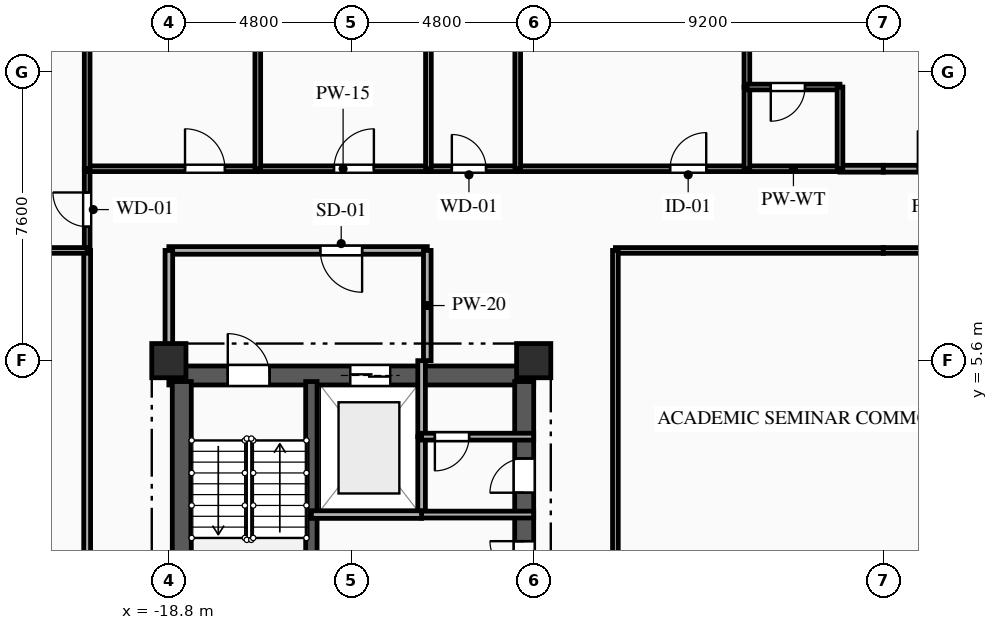
"""IFC4 building model, lengths in metres.
Left out: names, types, materials, properties, quantities, classifications, styles, units other than length and angle.
Written with IfcOpenShell. Run it as: python <this file> out.ifc"""

import sys

from ifc_helpers import new_model, si_unit, direction, frame, frame_2d, origin, origin_2d, place, context, subcontext, project, spatial, rectangle, extrude, element, fill, save


model = new_model("IFC4")
c1 = context("Model", 3, precision=1e-05, world=origin(), true_north=direction((0.0, 1.0)))
c2 = subcontext(c1, "Body", "Model", "MODEL_VIEW")
j1 = project(units=[si_unit("LENGTHUNIT", "METRE"), si_unit("PLANEANGLEUNIT", "RADIAN")], contexts=[c1])
p1 = place(None, origin())
s1 = spatial("IfcSite", under=j1, at=p1, CompositionType="ELEMENT")
p2 = place(p1, origin())
s2 = spatial("IfcBuilding", under=s1, at=p2, CompositionType="ELEMENT")
p3 = place(p2, frame((0.0, 0.0, 164.5)))
s3 = spatial("IfcBuildingStorey", under=s2, at=p3, CompositionType="ELEMENT", Elevation=164.5)
for number, where, z_axis, x_axis in (
    (1, (-18.8, 5.6, 0.0), (0.0, 0.0, 1.0), (1.0, 0.0, 0.0)),
    (2, (-9.2, 5.6, 0.0), (0.0, 0.0, 1.0), (1.0, 0.0, 0.0)),
):
    element("IfcColumn", number, at=place(p3, frame(where, z_axis=z_axis, x_axis=x_axis)), inside=s3, PredefinedType="COLUMN", context=c2, shape_type="SweptSolid", body=[
        extrude(rectangle(XDim=0.9, YDim=0.9, at=origin_2d()), origin(), (0.0, 0.0, 1.0), 3.35),
    ])
p4 = place(p3, frame((-18.8, 5.21, 0.0), z_axis=(0.0, 0.0, 1.0), x_axis=(1.0, 0.0, 0.0)))
e3 = element("IfcWall", 3, at=p4, inside=s3, PredefinedType="SHEAR", context=c2, shape_type="SweptSolid", body=[
    extrude(rectangle(XDim=9.6, YDim=0.5, at=frame_2d((4.8, 0.0))), origin(), (0.0, 0.0, 1.0), 3.04),
])
p5 = place(p4, frame((1.55, 0.0, 0.0)))
e4 = element("IfcOpeningElement", 4, at=p5, cuts=e3, PredefinedType="OPENING", context=c2, shape_type="SweptSolid", body=[
    extrude(rectangle(XDim=1.1, YDim=2.15, at=frame_2d((0.55, 1.075))), frame((0.0, 0.26, 0.0), z_axis=(0.0, -1.0, 0.0), x_axis=(1.0, 0.0, 0.0)), (0.0, 0.0, 1.0), 0.52),
])
p6 = place(p4, frame((4.775, 0.0, 0.0)))
e5 = element("IfcOpeningElement", 5, at=p6, cuts=e3, PredefinedType="OPENING", context=c2, shape_type="SweptSolid", body=[
    extrude(rectangle(XDim=1.05, YDim=2.1, at=frame_2d((0.525, 1.05))), frame((0.0, 0.26, 0.0), z_axis=(0.0, -1.0, 0.0), x_axis=(1.0, 0.0, 0.0)), (0.0, 0.0, 1.0), 0.52),
])
p7 = place(p3, frame((-18.46, -5.05, 0.0), z_axis=(0.0, 0.0, 1.0), x_axis=(0.0, 1.0, 0.0)))
e6 = element("IfcWall", 6, at=p7, inside=s3, PredefinedType="SHEAR", context=c2, shape_type="SweptSolid", body=[
    extrude(rectangle(XDim=10.1, YDim=0.5, at=frame_2d((5.05, 0.0))), origin(), (0.0, 0.0, 1.0), 3.04),
])
p8 = place(p3, frame((-9.45, -5.05, 0.0), z_axis=(0.0, 0.0, 1.0), x_axis=(0.0, 1.0, 0.0)))
e7 = element("IfcWall", 7, at=p8, inside=s3, PredefinedType="SHEAR", context=c2, shape_type="SweptSolid", body=[
    extrude(rectangle(XDim=10.1, YDim=0.5, at=frame_2d((5.05, 0.0))), origin(), (0.0, 0.0, 1.0), 3.04),
])
p9 = place(p8, frame((7.175, 0.0, 0.0)))
e8 = element("IfcOpeningElement", 8, at=p9, cuts=e7, PredefinedType="OPENING", context=c2, shape_type="SweptSolid", body=[
    extrude(rectangle(XDim=0.9, YDim=2.1, at=frame_2d((0.45, 1.05))), frame((0.0, 0.26, 0.0), z_axis=(0.0, -1.0, 0.0), x_axis=(1.0, 0.0, 0.0)), (0.0, 0.0, 1.0), 0.52),
])
p10 = place(p8, frame((2.4, 0.0, 0.0)))
e9 = element("IfcOpeningElement", 9, at=p10, cuts=e7, PredefinedType="OPENING", context=c2, shape_type="SweptSolid", body=[
    extrude(rectangle(XDim=1.2, YDim=2.15, at=frame_2d((0.6, 1.075))), frame((0.0, 0.26, 0.0), z_axis=(0.0, -1.0, 0.0), x_axis=(1.0, 0.0, 0.0)), (0.0, 0.0, 1.0), 0.52),
])
p11 = place(p8, frame((0.35, 0.0, 0.0)))
e10 = element("IfcOpeningElement", 10, at=p11, cuts=e7, PredefinedType="OPENING", context=c2, shape_type="SweptSolid", body=[
    extrude(rectangle(XDim=0.9, YDim=2.1, at=frame_2d((0.45, 1.05))), frame((0.0, 0.26, 0.0), z_axis=(0.0, -1.0, 0.0), x_axis=(1.0, 0.0, 0.0)), (0.0, 0.0, 1.0), 0.52),
])
p12 = place(p8, frame((5.0, 0.0, 0.0)))
e11 = element("IfcOpeningElement", 11, at=p12, cuts=e7, PredefinedType="OPENING", context=c2, shape_type="SweptSolid", body=[
    extrude(rectangle(XDim=0.9, YDim=2.1, at=frame_2d((0.45, 1.05))), frame((0.0, 0.26, 0.0), z_axis=(0.0, -1.0, 0.0), x_axis=(1.0, 0.0, 0.0)), (0.0, 0.0, 1.0), 0.52),
])
p13 = place(p3, frame((-15.05, -5.05, 0.0), z_axis=(0.0, 0.0, 1.0), x_axis=(0.0, 1.0, 0.0)))
e12 = element("IfcWall", 12, at=p13, inside=s3, PredefinedType="SHEAR", context=c2, shape_type="SweptSolid", body=[
    extrude(rectangle(XDim=10.1, YDim=0.3, at=frame_2d((5.05, 0.0))), origin(), (0.0, 0.0, 1.0), 3.04),
])
p14 = place(p3, frame((-12.15, 1.55, 0.0), z_axis=(0.0, 0.0, 1.0), x_axis=(0.0, 1.0, 0.0)))
e13 = element("IfcWall", 13, at=p14, inside=s3, PredefinedType="PARTITIONING", context=c2, shape_type="SweptSolid", body=[
    extrude(rectangle(XDim=2.05, YDim=0.2, at=frame_2d((1.025, 0.0))), origin(), (0.0, 0.0, 1.0), 3.04),
])
p15 = place(p3, frame((-12.15, 3.6, 0.0), z_axis=(0.0, 0.0, 1.0), x_axis=(0.0, 1.0, 0.0)))
e14 = element("IfcWall", 14, at=p15, inside=s3, PredefinedType="PARTITIONING", context=c2, shape_type="SweptSolid", body=[
    extrude(rectangle(XDim=2.0, YDim=0.2, at=frame_2d((1.0, 0.0))), origin(), (0.0, 0.0, 1.0), 3.04),
])
p16 = place(p3, frame((-12.0, 8.5, 0.0), z_axis=(0.0, 0.0, 1.0), x_axis=(-1.0, 0.0, 0.0)))
e15 = element("IfcWall", 15, at=p16, inside=s3, PredefinedType="PARTITIONING", context=c2, shape_type="SweptSolid", body=[
    extrude(rectangle(XDim=6.8, YDim=0.2, at=frame_2d((3.4, 0.0))), origin(), (0.0, 0.0, 1.0), 3.04),
])
p17 = place(p16, frame((1.715, 0.0, 0.0)))
e16 = element("IfcOpeningElement", 16, at=p17, cuts=e15, PredefinedType="OPENING", context=c2, shape_type="SweptSolid", body=[
    extrude(rectangle(XDim=1.1, YDim=2.15, at=frame_2d((0.55, 1.075))), frame((0.0, 0.11, 0.0), z_axis=(0.0, -1.0, 0.0), x_axis=(1.0, 0.0, 0.0)), (0.0, 0.0, 1.0), 0.22),
])
p18 = place(p3, frame((-18.8, 8.5, 0.0), z_axis=(0.0, 0.0, 1.0), x_axis=(0.0, -1.0, 0.0)))
e17 = element("IfcWall", 17, at=p18, inside=s3, PredefinedType="PARTITIONING", context=c2, shape_type="SweptSolid", body=[
    extrude(rectangle(XDim=2.9, YDim=0.2, at=frame_2d((1.45, 0.0))), origin(), (0.0, 0.0, 1.0), 2.525),
])
p19 = place(p3, frame((-12.0, 5.6, 0.0), z_axis=(0.0, 0.0, 1.0), x_axis=(0.0, 1.0, 0.0)))
e18 = element("IfcWall", 18, at=p19, inside=s3, PredefinedType="PARTITIONING", context=c2, shape_type="SweptSolid", body=[
    extrude(rectangle(XDim=2.9, YDim=0.2, at=frame_2d((1.45, 0.0))), origin(), (0.0, 0.0, 1.0), 3.04),
])
p20 = place(p3, frame((-9.2, 3.6, 0.0), z_axis=(0.0, 0.0, 1.0), x_axis=(-1.0, 0.0, 0.0)))
e19 = element("IfcWall", 19, at=p20, inside=s3, PredefinedType="PARTITIONING", context=c2, shape_type="SweptSolid", body=[
    extrude(rectangle(XDim=2.95, YDim=0.18, at=frame_2d((1.475, 0.0))), origin(), (0.0, 0.0, 1.0), 3.04),
])
p21 = place(p20, frame((1.7, 0.0, 0.0)))
e20 = element("IfcOpeningElement", 20, at=p21, cuts=e19, PredefinedType="OPENING", context=c2, shape_type="SweptSolid", body=[
    extrude(rectangle(XDim=0.9, YDim=2.1, at=frame_2d((0.45, 1.05))), frame((0.0, 0.1, 0.0), z_axis=(0.0, -1.0, 0.0), x_axis=(1.0, 0.0, 0.0)), (0.0, 0.0, 1.0), 0.2),
])
p22 = place(p3, frame((-12.15, 1.55, 0.0), z_axis=(0.0, 0.0, 1.0), x_axis=(1.0, 0.0, 0.0)))
e21 = element("IfcWall", 21, at=p22, inside=s3, PredefinedType="PARTITIONING", context=c2, shape_type="SweptSolid", body=[
    extrude(rectangle(XDim=2.95, YDim=0.18, at=frame_2d((1.475, 0.0))), origin(), (0.0, 0.0, 1.0), 3.04),
])
p23 = place(p3, frame((-20.95, 8.5, 0.0), z_axis=(0.0, 0.0, 1.0), x_axis=(0.0, 1.0, 0.0)))
e22 = element("IfcWall", 22, at=p23, inside=s3, PredefinedType="PARTITIONING", context=c2, shape_type="SweptSolid", body=[
    extrude(rectangle(XDim=2.15, YDim=0.15, at=frame_2d((1.075, 0.0))), origin(), (0.0, 0.0, 1.0), 3.04),
])
p24 = place(p23, frame((0.625, 0.0, 0.0)))
e23 = element("IfcOpeningElement", 23, at=p24, cuts=e22, PredefinedType="OPENING", context=c2, shape_type="SweptSolid", body=[
    extrude(rectangle(XDim=0.9, YDim=2.1, at=frame_2d((0.45, 1.05))), frame((0.0, 0.085, 0.0), z_axis=(0.0, -1.0, 0.0), x_axis=(1.0, 0.0, 0.0)), (0.0, 0.0, 1.0), 0.17),
])
p25 = place(p3, frame((-20.95, 10.65, 0.0), z_axis=(0.0, 0.0, 1.0), x_axis=(1.0, 0.0, 0.0)))
e24 = element("IfcWall", 24, at=p25, inside=s3, PredefinedType="PARTITIONING", context=c2, shape_type="SweptSolid", body=[
    extrude(rectangle(XDim=4.49, YDim=0.15, at=frame_2d((2.245, 0.0))), origin(), (0.0, 0.0, 1.0), 3.04),
])
p26 = place(p25, frame((2.575, 0.0, 0.0)))
e25 = element("IfcOpeningElement", 25, at=p26, cuts=e24, PredefinedType="OPENING", context=c2, shape_type="SweptSolid", body=[
    extrude(rectangle(XDim=1.05, YDim=2.15, at=frame_2d((0.525, 1.075))), frame((0.0, 0.085, 0.0), z_axis=(0.0, -1.0, 0.0), x_axis=(1.0, 0.0, 0.0)), (0.0, 0.0, 1.0), 0.17),
])
p27 = place(p3, frame((-16.46, 10.65, 0.0), z_axis=(0.0, 0.0, 1.0), x_axis=(1.0, 0.0, 0.0)))
e26 = element("IfcWall", 26, at=p27, inside=s3, PredefinedType="PARTITIONING", context=c2, shape_type="SweptSolid", body=[
    extrude(rectangle(XDim=4.49, YDim=0.15, at=frame_2d((2.245, 0.0))), origin(), (0.0, 0.0, 1.0), 3.04),
])
p28 = place(p27, frame((2.005, 0.0, 0.0)))
e27 = element("IfcOpeningElement", 27, at=p28, cuts=e26, PredefinedType="OPENING", context=c2, shape_type="SweptSolid", body=[
    extrude(rectangle(XDim=1.05, YDim=2.15, at=frame_2d((0.525, 1.075))), frame((0.0, 0.085, 0.0), z_axis=(0.0, -1.0, 0.0), x_axis=(1.0, 0.0, 0.0)), (0.0, 0.0, 1.0), 0.17),
])
p29 = place(p3, frame((-11.97, 10.65, 0.0), z_axis=(0.0, 0.0, 1.0), x_axis=(1.0, 0.0, 0.0)))
e28 = element("IfcWall", 28, at=p29, inside=s3, PredefinedType="PLUMBINGWALL", context=c2, shape_type="SweptSolid", body=[
    extrude(rectangle(XDim=2.35, YDim=0.15, at=frame_2d((1.175, 0.0))), origin(), (0.0, 0.0, 1.0), 3.04),
])
p30 = place(p29, frame((0.616, 0.0, 0.0)))
e29 = element("IfcOpeningElement", 29, at=p30, cuts=e28, PredefinedType="OPENING", context=c2, shape_type="SweptSolid", body=[
    extrude(rectangle(XDim=0.9, YDim=2.1, at=frame_2d((0.45, 1.05))), frame((0.0, 0.085, 0.0), z_axis=(0.0, -1.0, 0.0), x_axis=(1.0, 0.0, 0.0)), (0.0, 0.0, 1.0), 0.17),
])
p31 = place(p3, frame((-9.62, 10.65, 0.0), z_axis=(0.0, 0.0, 1.0), x_axis=(1.0, 0.0, 0.0)))
e30 = element("IfcWall", 30, at=p31, inside=s3, PredefinedType="PARTITIONING", context=c2, shape_type="SweptSolid", body=[
    extrude(rectangle(XDim=6.03, YDim=0.15, at=frame_2d((3.015, 0.0))), origin(), (0.0, 0.0, 1.0), 3.04),
])
p32 = place(p31, frame((4.01, 0.0, 0.0)))
e31 = element("IfcOpeningElement", 31, at=p32, cuts=e30, PredefinedType="OPENING", context=c2, shape_type="SweptSolid", body=[
    extrude(rectangle(XDim=0.95, YDim=2.1, at=frame_2d((0.475, 1.05))), frame((0.0, 0.085, 0.0), z_axis=(0.0, -1.0, 0.0), x_axis=(1.0, 0.0, 0.0)), (0.0, 0.0, 1.0), 0.17),
])
p33 = place(p3, frame((-1.14, 10.65, 0.0), z_axis=(0.0, 0.0, 1.0), x_axis=(1.0, 0.0, 0.0)))
e32 = element("IfcWall", 32, at=p33, inside=s3, PredefinedType="PARTITIONING", context=c2, shape_type="SweptSolid", body=[
    extrude(rectangle(XDim=1.14, YDim=0.18, at=frame_2d((0.57, 0.0))), origin(), (0.0, 0.0, 1.0), 3.04),
])
p34 = place(p3, frame((-3.59, 10.65, 0.0), z_axis=(0.0, 0.0, 1.0), x_axis=(1.0, 0.0, 0.0)))
e33 = element("IfcWall", 33, at=p34, inside=s3, PredefinedType="PLUMBINGWALL", context=c2, shape_type="SweptSolid", body=[
    extrude(rectangle(XDim=2.45, YDim=0.15, at=frame_2d((1.225, 0.0))), origin(), (0.0, 0.0, 1.0), 3.04),
])
p35 = place(p3, frame((0.0, 8.5, 0.0), z_axis=(0.0, 0.0, 1.0), x_axis=(-1.0, 0.0, 0.0)))
e34 = element("IfcWall", 34, at=p35, inside=s3, PredefinedType="PARTITIONING", context=c2, shape_type="SweptSolid", body=[
    extrude(rectangle(XDim=7.05, YDim=0.15, at=frame_2d((3.525, 0.0))), origin(), (0.0, 0.0, 1.0), 3.04),
])
p36 = place(p3, frame((0.0, 10.65, 0.0), z_axis=(0.0, 0.0, 1.0), x_axis=(1.0, 0.0, 0.0)))
e35 = element("IfcWall", 35, at=p36, inside=s3, PredefinedType="PARTITIONING", context=c2, shape_type="SweptSolid", body=[
    extrude(rectangle(XDim=4.79, YDim=0.18, at=frame_2d((2.395, 0.0))), origin(), (0.0, 0.0, 1.0), 3.04),
])
p37 = place(p36, frame((0.909, 0.0, 0.0)))
e36 = element("IfcOpeningElement", 36, at=p37, cuts=e35, PredefinedType="OPENING", context=c2, shape_type="SweptSolid", body=[
    extrude(rectangle(XDim=1.0, YDim=2.15, at=frame_2d((0.5, 1.075))), frame((0.0, 0.1, 0.0), z_axis=(0.0, -1.0, 0.0), x_axis=(1.0, 0.0, 0.0)), (0.0, 0.0, 1.0), 0.2),
])
p38 = place(p3, frame((7.05, 8.5, 0.0), z_axis=(0.0, 0.0, 1.0), x_axis=(-1.0, 0.0, 0.0)))
e37 = element("IfcWall", 37, at=p38, inside=s3, PredefinedType="PARTITIONING", context=c2, shape_type="SweptSolid", body=[
    extrude(rectangle(XDim=7.05, YDim=0.15, at=frame_2d((3.525, 0.0))), origin(), (0.0, 0.0, 1.0), 3.04),
])
p39 = place(p3, frame((-20.95, -5.6, 0.0), z_axis=(0.0, 0.0, 1.0), x_axis=(0.0, 1.0, 0.0)))
e38 = element("IfcWall", 38, at=p39, inside=s3, PredefinedType="PARTITIONING", context=c2, shape_type="SweptSolid", body=[
    extrude(rectangle(XDim=14.1, YDim=0.18, at=frame_2d((7.05, 0.0))), origin(), (0.0, 0.0, 1.0), 3.04),
])
p40 = place(p39, frame((5.058, 0.0, 0.0)))
e39 = element("IfcOpeningElement", 39, at=p40, cuts=e38, PredefinedType="OPENING", context=c2, shape_type="SweptSolid", body=[
    extrude(rectangle(XDim=1.0, YDim=2.15, at=frame_2d((0.5, 1.075))), frame((0.0, 0.1, 0.0), z_axis=(0.0, -1.0, 0.0), x_axis=(1.0, 0.0, 0.0)), (0.0, 0.0, 1.0), 0.2),
])
p41 = place(p3, frame((-7.05, 8.5, 0.0), z_axis=(0.0, 0.0, 1.0), x_axis=(0.0, -1.0, 0.0)))
e40 = element("IfcWall", 40, at=p41, inside=s3, PredefinedType="PARTITIONING", context=c2, shape_type="SweptSolid", body=[
    extrude(rectangle(XDim=9.3, YDim=0.15, at=frame_2d((4.65, 0.0))), origin(), (0.0, 0.0, 1.0), 3.04),
])
p42 = place(p3, frame((-23.6, 8.5, 0.0), z_axis=(0.0, 0.0, 1.0), x_axis=(1.0, 0.0, 0.0)))
e41 = element("IfcWall", 41, at=p42, inside=s3, PredefinedType="PARTITIONING", context=c2, shape_type="SweptSolid", body=[
    extrude(rectangle(XDim=2.65, YDim=0.15, at=frame_2d((1.325, 0.0))), origin(), (0.0, 0.0, 1.0), 3.04),
])
p43 = place(p42, frame((0.635, 0.0, 0.0)))
e42 = element("IfcOpeningElement", 42, at=p43, cuts=e41, PredefinedType="OPENING", context=c2, shape_type="SweptSolid", body=[
    extrude(rectangle(XDim=1.05, YDim=2.15, at=frame_2d((0.525, 1.075))), frame((0.0, 0.085, 0.0), z_axis=(0.0, -1.0, 0.0), x_axis=(1.0, 0.0, 0.0)), (0.0, 0.0, 1.0), 0.17),
])
for number, where, z_axis, x_axis in (
    (43, (-20.95, 20.4, 0.0), (0.0, 0.0, 1.0), (0.0, -1.0, 0.0)),
    (44, (-16.46, 20.4, 0.0), (0.0, 0.0, 1.0), (0.0, -1.0, 0.0)),
):
    element("IfcWall", number, at=place(p3, frame(where, z_axis=z_axis, x_axis=x_axis)), inside=s3, PredefinedType="PARTITIONING", context=c2, shape_type="SweptSolid", body=[
        extrude(rectangle(XDim=9.75, YDim=0.15, at=frame_2d((4.875, 0.0))), origin(), (0.0, 0.0, 1.0), 3.04),
    ])
for number, where, z_axis, x_axis in (
    (45, (-11.97, 20.4, 0.0), (0.0, 0.0, 1.0), (0.0, -1.0, 0.0)),
    (46, (-9.62, 20.4, 0.0), (0.0, 0.0, 1.0), (0.0, -1.0, 0.0)),
):
    element("IfcWall", number, at=place(p3, frame(where, z_axis=z_axis, x_axis=x_axis)), inside=s3, PredefinedType="PLUMBINGWALL", context=c2, shape_type="SweptSolid", body=[
        extrude(rectangle(XDim=9.75, YDim=0.15, at=frame_2d((4.875, 0.0))), origin(), (0.0, 0.0, 1.0), 3.04),
    ])
p44 = place(p3, frame((-3.59, 20.4, 0.0), z_axis=(0.0, 0.0, 1.0), x_axis=(0.0, -1.0, 0.0)))
e47 = element("IfcWall", 47, at=p44, inside=s3, PredefinedType="PARTITIONING", context=c2, shape_type="SweptSolid", body=[
    extrude(rectangle(XDim=7.6, YDim=0.15, at=frame_2d((3.8, 0.0))), origin(), (0.0, 0.0, 1.0), 3.04),
])
p45 = place(p3, frame((-3.59, 12.8, 0.0), z_axis=(0.0, 0.0, 1.0), x_axis=(0.0, -1.0, 0.0)))
e48 = element("IfcWall", 48, at=p45, inside=s3, PredefinedType="PLUMBINGWALL", context=c2, shape_type="SweptSolid", body=[
    extrude(rectangle(XDim=2.15, YDim=0.15, at=frame_2d((1.075, 0.0))), origin(), (0.0, 0.0, 1.0), 3.04),
])
p46 = place(p3, frame((-1.14, 12.8, 0.0), z_axis=(0.0, 0.0, 1.0), x_axis=(-1.0, 0.0, 0.0)))
e49 = element("IfcWall", 49, at=p46, inside=s3, PredefinedType="PLUMBINGWALL", context=c2, shape_type="SweptSolid", body=[
    extrude(rectangle(XDim=2.45, YDim=0.15, at=frame_2d((1.225, 0.0))), origin(), (0.0, 0.0, 1.0), 3.04),
])
p47 = place(p46, frame((0.921, 0.0, 0.0)))
e50 = element("IfcOpeningElement", 50, at=p47, cuts=e49, PredefinedType="OPENING", context=c2, shape_type="SweptSolid", body=[
    extrude(rectangle(XDim=0.9, YDim=2.1, at=frame_2d((0.45, 1.05))), frame((0.0, 0.085, 0.0), z_axis=(0.0, -1.0, 0.0), x_axis=(1.0, 0.0, 0.0)), (0.0, 0.0, 1.0), 0.17),
])
p48 = place(p3, frame((-1.14, 10.65, 0.0), z_axis=(0.0, 0.0, 1.0), x_axis=(0.0, 1.0, 0.0)))
e51 = element("IfcWall", 51, at=p48, inside=s3, PredefinedType="PLUMBINGWALL", context=c2, shape_type="SweptSolid", body=[
    extrude(rectangle(XDim=2.15, YDim=0.15, at=frame_2d((1.075, 0.0))), origin(), (0.0, 0.0, 1.0), 3.04),
])
p49 = place(p3, frame((-15.05, 1.55, 0.0), z_axis=(0.0, 0.0, 1.0), x_axis=(1.0, 0.0, 0.0)))
e52 = element("IfcWall", 52, at=p49, inside=s3, PredefinedType="PARTITIONING", context=c2, shape_type="SweptSolid", body=[
    extrude(rectangle(XDim=2.9, YDim=0.2, at=frame_2d((1.45, 0.0))), origin(), (0.0, 0.0, 1.0), 3.04),
])
p50 = place(p5, origin())
e53 = element("IfcDoor", 53, at=p50, inside=s3, OperationType="SINGLE_SWING_LEFT", PredefinedType="DOOR", context=c2, shape_type="SweptSolid", body=[
    extrude(rectangle(XDim=1.1, YDim=2.15, at=frame_2d((0.55, 1.075))), frame((0.0, 0.025, 0.0), z_axis=(0.0, -1.0, 0.0), x_axis=(1.0, 0.0, 0.0)), (0.0, 0.0, 1.0), 0.05),
])
fill(e4, e53)
p51 = place(p6, origin())
e54 = element("IfcDoor", 54, at=p51, inside=s3, OperationType="DOUBLE_DOOR_SLIDING", PredefinedType="DOOR", context=c2, shape_type="SweptSolid", body=[
    extrude(rectangle(XDim=1.05, YDim=2.1, at=frame_2d((0.525, 1.05))), frame((0.0, 0.025, 0.0), z_axis=(0.0, -1.0, 0.0), x_axis=(1.0, 0.0, 0.0)), (0.0, 0.0, 1.0), 0.05),
])
fill(e5, e54)
p52 = place(p17, origin())
e55 = element("IfcDoor", 55, at=p52, inside=s3, OperationType="SINGLE_SWING_LEFT", PredefinedType="DOOR", context=c2, shape_type="SweptSolid", body=[
    extrude(rectangle(XDim=1.1, YDim=2.15, at=frame_2d((0.55, 1.075))), frame((0.0, 0.025, 0.0), z_axis=(0.0, -1.0, 0.0), x_axis=(1.0, 0.0, 0.0)), (0.0, 0.0, 1.0), 0.05),
])
fill(e16, e55)
p53 = place(p21, origin())
e56 = element("IfcDoor", 56, at=p53, inside=s3, OperationType="SINGLE_SWING_RIGHT", PredefinedType="DOOR", context=c2, shape_type="SweptSolid", body=[
    extrude(rectangle(XDim=0.9, YDim=2.1, at=frame_2d((0.45, 1.05))), frame((0.0, 0.025, 0.0), z_axis=(0.0, -1.0, 0.0), x_axis=(1.0, 0.0, 0.0)), (0.0, 0.0, 1.0), 0.05),
])
fill(e20, e56)
p54 = place(p9, origin())
e57 = element("IfcDoor", 57, at=p54, inside=s3, OperationType="SINGLE_SWING_LEFT", PredefinedType="DOOR", context=c2, shape_type="SweptSolid", body=[
    extrude(rectangle(XDim=0.9, YDim=2.1, at=frame_2d((0.45, 1.05))), frame((0.0, 0.025, 0.0), z_axis=(0.0, -1.0, 0.0), x_axis=(1.0, 0.0, 0.0)), (0.0, 0.0, 1.0), 0.05),
])
fill(e8, e57)
p55 = place(p12, origin())
e58 = element("IfcDoor", 58, at=p55, inside=s3, OperationType="SINGLE_SWING_RIGHT", PredefinedType="DOOR", context=c2, shape_type="SweptSolid", body=[
    extrude(rectangle(XDim=0.9, YDim=2.1, at=frame_2d((0.45, 1.05))), frame((0.0, 0.025, 0.0), z_axis=(0.0, -1.0, 0.0), x_axis=(1.0, 0.0, 0.0)), (0.0, 0.0, 1.0), 0.05),
])
fill(e11, e58)
p56 = place(p24, origin())
e59 = element("IfcDoor", 59, at=p56, inside=s3, OperationType="SINGLE_SWING_RIGHT", PredefinedType="DOOR", context=c2, shape_type="SweptSolid", body=[
    extrude(rectangle(XDim=0.9, YDim=2.1, at=frame_2d((0.45, 1.05))), frame((0.0, 0.025, 0.0), z_axis=(0.0, -1.0, 0.0), x_axis=(1.0, 0.0, 0.0)), (0.0, 0.0, 1.0), 0.05),
])
fill(e23, e59)
p57 = place(p26, origin())
e60 = element("IfcDoor", 60, at=p57, inside=s3, OperationType="SINGLE_SWING_LEFT", PredefinedType="DOOR", context=c2, shape_type="SweptSolid", body=[
    extrude(rectangle(XDim=1.05, YDim=2.15, at=frame_2d((0.525, 1.075))), frame((0.0, 0.025, 0.0), z_axis=(0.0, -1.0, 0.0), x_axis=(1.0, 0.0, 0.0)), (0.0, 0.0, 1.0), 0.05),
])
fill(e25, e60)
p58 = place(p28, origin())
e61 = element("IfcDoor", 61, at=p58, inside=s3, OperationType="SINGLE_SWING_RIGHT", PredefinedType="DOOR", context=c2, shape_type="SweptSolid", body=[
    extrude(rectangle(XDim=1.05, YDim=2.15, at=frame_2d((0.525, 1.075))), frame((0.0, 0.025, 0.0), z_axis=(0.0, -1.0, 0.0), x_axis=(1.0, 0.0, 0.0)), (0.0, 0.0, 1.0), 0.05),
])
fill(e27, e61)
p59 = place(p30, origin())
e62 = element("IfcDoor", 62, at=p59, inside=s3, OperationType="SINGLE_SWING_LEFT", PredefinedType="DOOR", context=c2, shape_type="SweptSolid", body=[
    extrude(rectangle(XDim=0.9, YDim=2.1, at=frame_2d((0.45, 1.05))), frame((0.0, 0.025, 0.0), z_axis=(0.0, -1.0, 0.0), x_axis=(1.0, 0.0, 0.0)), (0.0, 0.0, 1.0), 0.05),
])
fill(e29, e62)
p60 = place(p32, origin())
e63 = element("IfcDoor", 63, at=p60, inside=s3, OperationType="SINGLE_SWING_RIGHT", PredefinedType="DOOR", context=c2, shape_type="SweptSolid", body=[
    extrude(rectangle(XDim=0.95, YDim=2.1, at=frame_2d((0.475, 1.05))), frame((0.0, 0.025, 0.0), z_axis=(0.0, -1.0, 0.0), x_axis=(1.0, 0.0, 0.0)), (0.0, 0.0, 1.0), 0.05),
])
fill(e31, e63)
p61 = place(p37, origin())
e64 = element("IfcDoor", 64, at=p61, inside=s3, OperationType="SINGLE_SWING_LEFT", PredefinedType="DOOR", context=c2, shape_type="SweptSolid", body=[
    extrude(rectangle(XDim=1.0, YDim=2.15, at=frame_2d((0.5, 1.075))), frame((0.0, 0.025, 0.0), z_axis=(0.0, -1.0, 0.0), x_axis=(1.0, 0.0, 0.0)), (0.0, 0.0, 1.0), 0.05),
])
fill(e36, e64)
p62 = place(p47, origin())
e65 = element("IfcDoor", 65, at=p62, inside=s3, OperationType="SINGLE_SWING_RIGHT", PredefinedType="DOOR", context=c2, shape_type="SweptSolid", body=[
    extrude(rectangle(XDim=0.9, YDim=2.1, at=frame_2d((0.45, 1.05))), frame((0.0, 0.025, 0.0), z_axis=(0.0, -1.0, 0.0), x_axis=(1.0, 0.0, 0.0)), (0.0, 0.0, 1.0), 0.05),
])
fill(e50, e65)
save(model, sys.argv[1])
